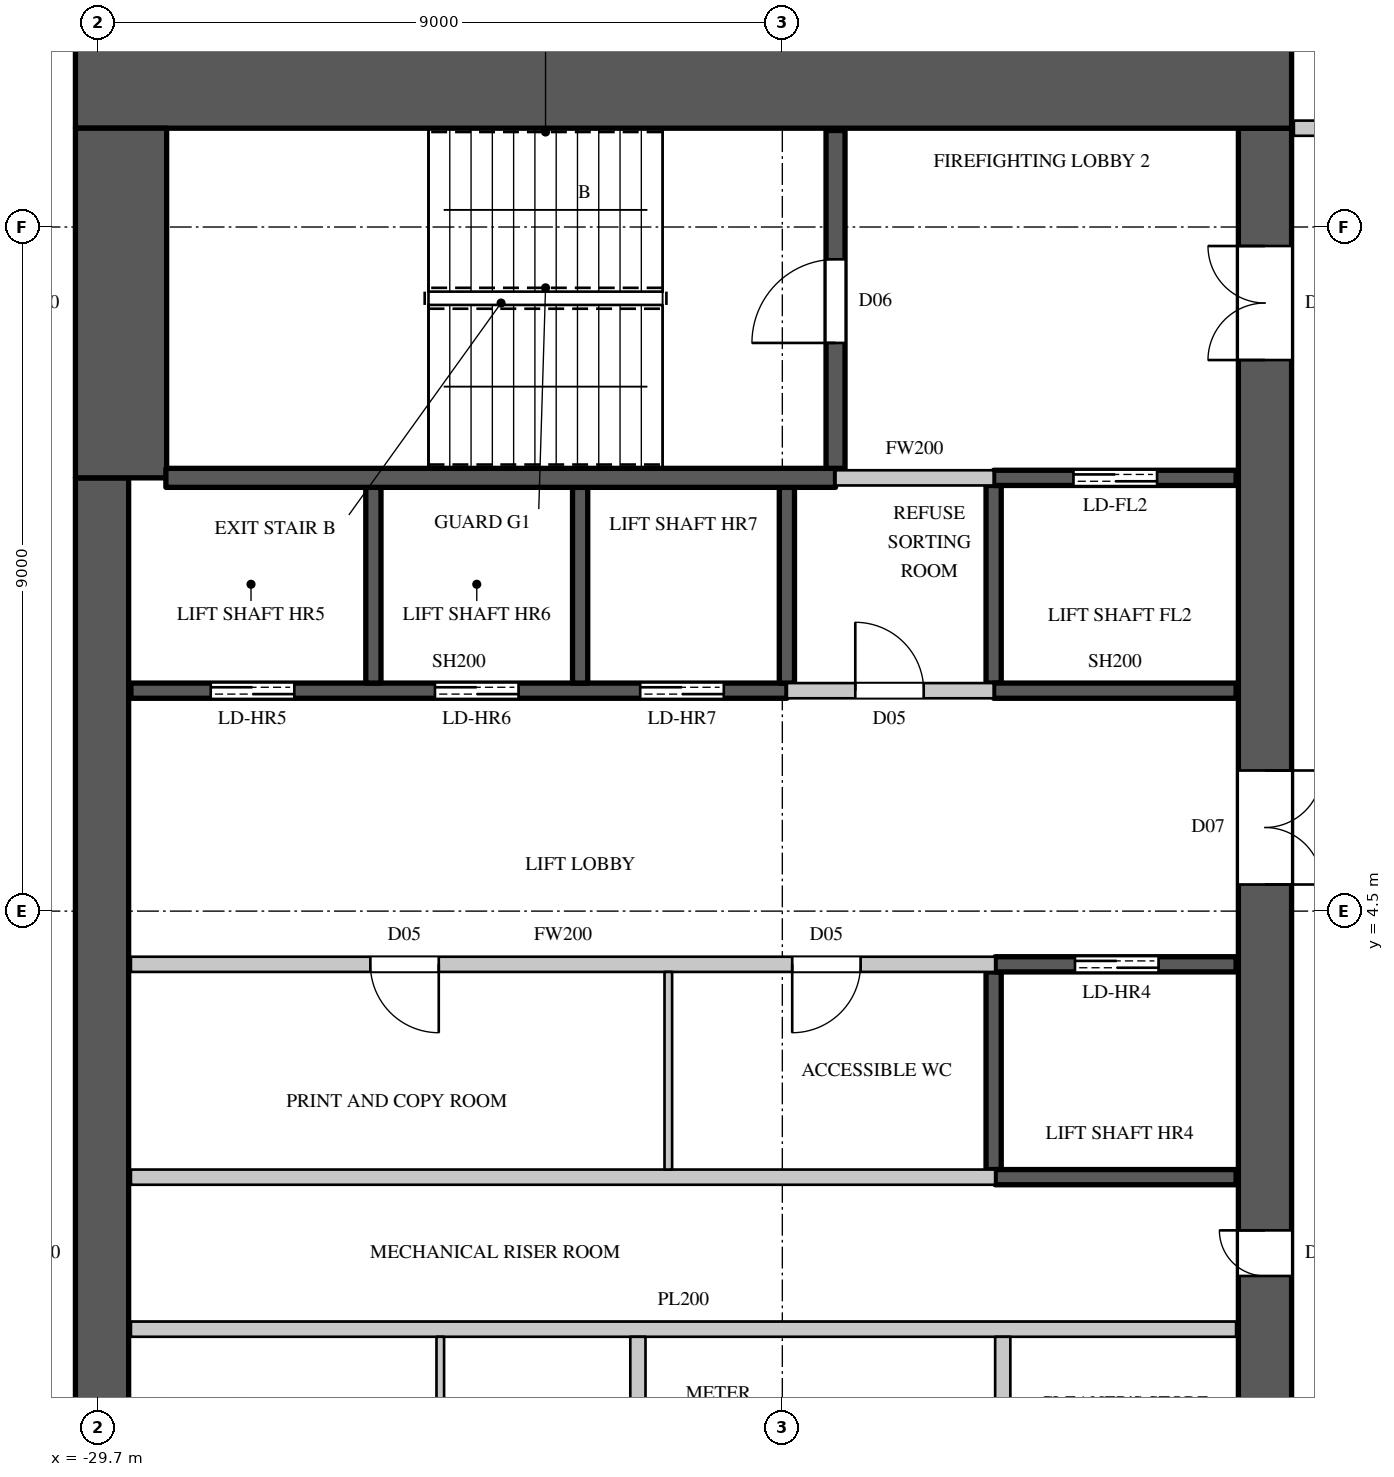
"""IFC4 building model, lengths in metres.
Left out: names, types, materials, properties, quantities, classifications, styles, units other than length and angle.
Written with IfcOpenShell. Run it as: python <this file> out.ifc"""

import sys

from ifc_helpers import new_model, si_unit, direction, frame, frame_2d, origin, place, context, subcontext, project, spatial, rectangle, extrude, element, fill, save


model = new_model("IFC4")
c1 = context("Model", 3, precision=1e-05, world=origin(), true_north=direction((0.0, 1.0)))
c2 = subcontext(c1, "Body", "Model", "MODEL_VIEW")
j1 = project(units=[si_unit("LENGTHUNIT", "METRE"), si_unit("PLANEANGLEUNIT", "RADIAN")], contexts=[c1])
p1 = place(None, origin())
s1 = spatial("IfcSite", under=j1, at=p1, CompositionType="ELEMENT")
p2 = place(p1, origin())
s2 = spatial("IfcBuilding", under=s1, at=p2, CompositionType="ELEMENT")
p3 = place(p2, frame((0.0, 0.0, 325.4)))
s3 = spatial("IfcBuildingStorey", under=s2, at=p3, CompositionType="ELEMENT", Elevation=325.4)
p4 = place(p3, frame((-30.0, 15.4, 0.0), z_axis=(0.0, 0.0, 1.0), x_axis=(1.0, 0.0, 0.0)))
e1 = element("IfcWall", 1, at=p4, inside=s3, PredefinedType="SHEAR", context=c2, shape_type="SweptSolid", body=[
    extrude(rectangle(XDim=16.0, YDim=1.2, at=frame_2d((8.0, 0.0))), origin(), (0.0, 0.0, 1.0), 4.1),
])
p5 = place(p3, frame((-14.35, -14.8, 0.0), z_axis=(0.0, 0.0, 1.0), x_axis=(0.0, 1.0, 0.0)))
e2 = element("IfcWall", 2, at=p5, inside=s3, PredefinedType="SHEAR", context=c2, shape_type="SweptSolid", body=[
    extrude(rectangle(XDim=29.6, YDim=0.7, at=frame_2d((14.8, 0.0))), origin(), (0.0, 0.0, 1.0), 4.1),
])
p6 = place(p5, frame((1.55, 0.0, 0.0)))
e3 = element("IfcOpeningElement", 3, at=p6, cuts=e2, PredefinedType="OPENING", context=c2, shape_type="SweptSolid", body=[
    extrude(rectangle(XDim=1.5, YDim=2.4, at=frame_2d((0.75, 1.2))), frame((0.0, 0.36, 0.0), z_axis=(0.0, -1.0, 0.0), x_axis=(1.0, 0.0, 0.0)), (0.0, 0.0, 1.0), 0.72),
])
p7 = place(p5, frame((26.55, 0.0, 0.0)))
e4 = element("IfcOpeningElement", 4, at=p7, cuts=e2, PredefinedType="OPENING", context=c2, shape_type="SweptSolid", body=[
    extrude(rectangle(XDim=1.5, YDim=2.4, at=frame_2d((0.75, 1.2))), frame((0.0, 0.36, 0.0), z_axis=(0.0, -1.0, 0.0), x_axis=(1.0, 0.0, 0.0)), (0.0, 0.0, 1.0), 0.72),
])
p8 = place(p5, frame((8.45, 0.0, 0.0)))
e5 = element("IfcOpeningElement", 5, at=p8, cuts=e2, PredefinedType="OPENING", context=c2, shape_type="SweptSolid", body=[
    extrude(rectangle(XDim=1.5, YDim=2.4, at=frame_2d((0.75, 1.2))), frame((0.0, 0.36, 0.0), z_axis=(0.0, -1.0, 0.0), x_axis=(1.0, 0.0, 0.0)), (0.0, 0.0, 1.0), 0.72),
])
p9 = place(p5, frame((19.65, 0.0, 0.0)))
e6 = element("IfcOpeningElement", 6, at=p9, cuts=e2, PredefinedType="OPENING", context=c2, shape_type="SweptSolid", body=[
    extrude(rectangle(XDim=1.5, YDim=2.4, at=frame_2d((0.75, 1.2))), frame((0.0, 0.36, 0.0), z_axis=(0.0, -1.0, 0.0), x_axis=(1.0, 0.0, 0.0)), (0.0, 0.0, 1.0), 0.72),
])
p10 = place(p5, frame((14.5, 0.0, 0.0)))
e7 = element("IfcOpeningElement", 7, at=p10, cuts=e2, PredefinedType="OPENING", context=c2, shape_type="SweptSolid", body=[
    extrude(rectangle(XDim=0.6, YDim=2.0, at=frame_2d((0.3, 1.0))), frame((0.0, 0.36, 0.0), z_axis=(0.0, -1.0, 0.0), x_axis=(1.0, 0.0, 0.0)), (0.0, 0.0, 1.0), 0.72),
])
p11 = place(p3, frame((-29.65, -10.2, 0.0), z_axis=(0.0, 0.0, 1.0), x_axis=(0.0, 1.0, 0.0)))
e8 = element("IfcWall", 8, at=p11, inside=s3, PredefinedType="SHEAR", context=c2, shape_type="SweptSolid", body=[
    extrude(rectangle(XDim=20.4, YDim=0.7, at=frame_2d((10.2, 0.0))), origin(), (0.0, 0.0, 1.0), 4.1),
])
p12 = place(p3, frame((-29.4, 10.2, 0.0), z_axis=(0.0, 0.0, 1.0), x_axis=(0.0, 1.0, 0.0)))
e9 = element("IfcWall", 9, at=p12, inside=s3, PredefinedType="SHEAR", context=c2, shape_type="SweptSolid", body=[
    extrude(rectangle(XDim=4.6, YDim=1.2, at=frame_2d((2.3, 0.0))), origin(), (0.0, 0.0, 1.0), 4.1),
])
p13 = place(p3, frame((-29.27, 3.8, 0.0), z_axis=(0.0, 0.0, 1.0), x_axis=(1.0, 0.0, 0.0)))
e10 = element("IfcWall", 10, at=p13, inside=s3, PredefinedType="PARTITIONING", context=c2, shape_type="SweptSolid", body=[
    extrude(rectangle(XDim=11.37, YDim=0.2, at=frame_2d((5.685, 0.0))), origin(), (0.0, 0.0, 1.0), 3.8),
])
p14 = place(p13, frame((3.15, 0.0, 0.0)))
e11 = element("IfcOpeningElement", 11, at=p14, cuts=e10, PredefinedType="OPENING", context=c2, shape_type="SweptSolid", body=[
    extrude(rectangle(XDim=0.9, YDim=2.2, at=frame_2d((0.45, 1.1))), frame((0.0, 0.11, 0.0), z_axis=(0.0, -1.0, 0.0), x_axis=(1.0, 0.0, 0.0)), (0.0, 0.0, 1.0), 0.22),
])
p15 = place(p13, frame((8.7, 0.0, 0.0)))
e12 = element("IfcOpeningElement", 12, at=p15, cuts=e10, PredefinedType="OPENING", context=c2, shape_type="SweptSolid", body=[
    extrude(rectangle(XDim=0.9, YDim=2.2, at=frame_2d((0.45, 1.1))), frame((0.0, 0.11, 0.0), z_axis=(0.0, -1.0, 0.0), x_axis=(1.0, 0.0, 0.0)), (0.0, 0.0, 1.0), 0.22),
])
p16 = place(p3, frame((-20.64, 7.4, 0.0), z_axis=(0.0, 0.0, 1.0), x_axis=(1.0, 0.0, 0.0)))
e13 = element("IfcWall", 13, at=p16, inside=s3, PredefinedType="PARTITIONING", context=c2, shape_type="SweptSolid", body=[
    extrude(rectangle(XDim=2.72, YDim=0.2, at=frame_2d((1.36, 0.0))), origin(), (0.0, 0.0, 1.0), 3.8),
])
p17 = place(p16, frame((0.9, 0.0, 0.0)))
e14 = element("IfcOpeningElement", 14, at=p17, cuts=e13, PredefinedType="OPENING", context=c2, shape_type="SweptSolid", body=[
    extrude(rectangle(XDim=0.9, YDim=2.2, at=frame_2d((0.45, 1.1))), frame((0.0, 0.11, 0.0), z_axis=(0.0, -1.0, 0.0), x_axis=(1.0, 0.0, 0.0)), (0.0, 0.0, 1.0), 0.22),
])
p18 = place(p3, frame((-20.0, 10.2, 0.0), z_axis=(0.0, 0.0, 1.0), x_axis=(1.0, 0.0, 0.0)))
e15 = element("IfcWall", 15, at=p18, inside=s3, PredefinedType="PARTITIONING", context=c2, shape_type="SweptSolid", body=[
    extrude(rectangle(XDim=2.08, YDim=0.2, at=frame_2d((1.04, 0.0))), origin(), (0.0, 0.0, 1.0), 3.8),
])
p19 = place(p3, frame((-13.97, 14.8, 0.0), z_axis=(0.0, 0.0, 1.0), x_axis=(1.0, 0.0, 0.0)))
e16 = element("IfcWall", 16, at=p19, inside=s3, PredefinedType="PARTITIONING", context=c2, shape_type="SweptSolid", body=[
    extrude(rectangle(XDim=3.07, YDim=0.2, at=frame_2d((1.535, 0.0))), origin(), (0.0, 0.0, 1.0), 3.8),
])
p20 = place(p3, frame((-29.27, -1.0, 0.0), z_axis=(0.0, 0.0, 1.0), x_axis=(1.0, 0.0, 0.0)))
e17 = element("IfcWall", 17, at=p20, inside=s3, PredefinedType="PARTITIONING", context=c2, shape_type="SweptSolid", body=[
    extrude(rectangle(XDim=14.54, YDim=0.2, at=frame_2d((7.27, 0.0))), origin(), (0.0, 0.0, 1.0), 3.8),
])
p21 = place(p3, frame((-29.27, 1.0, 0.0), z_axis=(0.0, 0.0, 1.0), x_axis=(1.0, 0.0, 0.0)))
e18 = element("IfcWall", 18, at=p21, inside=s3, PredefinedType="PARTITIONING", context=c2, shape_type="SweptSolid", body=[
    extrude(rectangle(XDim=11.37, YDim=0.2, at=frame_2d((5.685, 0.0))), origin(), (0.0, 0.0, 1.0), 3.8),
])
for number, where, z_axis, x_axis in (
    (19, (-22.6, -3.7, 0.0), (0.0, 0.0, 1.0), (0.0, 1.0, 0.0)),
    (20, (-17.8, -3.7, 0.0), (0.0, 0.0, 1.0), (0.0, 1.0, 0.0)),
):
    element("IfcWall", number, at=place(p3, frame(where, z_axis=z_axis, x_axis=x_axis)), inside=s3, PredefinedType="PARTITIONING", context=c2, shape_type="SweptSolid", body=[
        extrude(rectangle(XDim=2.6, YDim=0.2, at=frame_2d((1.3, 0.0))), origin(), (0.0, 0.0, 1.0), 3.8),
    ])
p22 = place(p3, frame((-29.27, 7.4, 0.0), z_axis=(0.0, 0.0, 1.0), x_axis=(1.0, 0.0, 0.0)))
e21 = element("IfcWall", 21, at=p22, inside=s3, PredefinedType="SHEAR", context=c2, shape_type="SweptSolid", body=[
    extrude(rectangle(XDim=8.63, YDim=0.2, at=frame_2d((4.315, 0.0))), origin(), (0.0, 0.0, 1.0), 3.8),
])
p23 = place(p22, frame((1.05, 0.0, 0.0)))
e22 = element("IfcOpeningElement", 22, at=p23, cuts=e21, PredefinedType="OPENING", context=c2, shape_type="SweptSolid", body=[
    extrude(rectangle(XDim=1.1, YDim=2.2, at=frame_2d((0.55, 1.1))), frame((0.0, 0.11, 0.0), z_axis=(0.0, -1.0, 0.0), x_axis=(1.0, 0.0, 0.0)), (0.0, 0.0, 1.0), 0.22),
])
p24 = place(p22, frame((4.0, 0.0, 0.0)))
e23 = element("IfcOpeningElement", 23, at=p24, cuts=e21, PredefinedType="OPENING", context=c2, shape_type="SweptSolid", body=[
    extrude(rectangle(XDim=1.1, YDim=2.2, at=frame_2d((0.55, 1.1))), frame((0.0, 0.11, 0.0), z_axis=(0.0, -1.0, 0.0), x_axis=(1.0, 0.0, 0.0)), (0.0, 0.0, 1.0), 0.22),
])
p25 = place(p22, frame((6.7, 0.0, 0.0)))
e24 = element("IfcOpeningElement", 24, at=p25, cuts=e21, PredefinedType="OPENING", context=c2, shape_type="SweptSolid", body=[
    extrude(rectangle(XDim=1.1, YDim=2.2, at=frame_2d((0.55, 1.1))), frame((0.0, 0.11, 0.0), z_axis=(0.0, -1.0, 0.0), x_axis=(1.0, 0.0, 0.0)), (0.0, 0.0, 1.0), 0.22),
])
for number, where, z_axis, x_axis in (
    (25, (-26.08, 7.5, 0.0), (0.0, 0.0, 1.0), (0.0, 1.0, 0.0)),
    (26, (-23.36, 7.5, 0.0), (0.0, 0.0, 1.0), (0.0, 1.0, 0.0)),
):
    element("IfcWall", number, at=place(p3, frame(where, z_axis=z_axis, x_axis=x_axis)), inside=s3, PredefinedType="SHEAR", context=c2, shape_type="SweptSolid", body=[
        extrude(rectangle(XDim=2.575, YDim=0.2, at=frame_2d((1.288, 0.0))), origin(), (0.0, 0.0, 1.0), 4.1),
    ])
p26 = place(p3, frame((-20.64, 7.5, 0.0), z_axis=(0.0, 0.0, 1.0), x_axis=(0.0, 1.0, 0.0)))
e27 = element("IfcWall", 27, at=p26, inside=s3, PredefinedType="SHEAR", context=c2, shape_type="SweptSolid", body=[
    extrude(rectangle(XDim=2.575, YDim=0.2, at=frame_2d((1.288, 0.0))), origin(), (0.0, 0.0, 1.0), 3.8),
])
p27 = place(p3, frame((-17.92, 1.1, 0.0), z_axis=(0.0, 0.0, 1.0), x_axis=(0.0, 1.0, 0.0)))
e28 = element("IfcWall", 28, at=p27, inside=s3, PredefinedType="SHEAR", context=c2, shape_type="SweptSolid", body=[
    extrude(rectangle(XDim=2.6, YDim=0.2, at=frame_2d((1.3, 0.0))), origin(), (0.0, 0.0, 1.0), 3.8),
])
p28 = place(p3, frame((-17.9, 1.0, 0.0), z_axis=(0.0, 0.0, 1.0), x_axis=(1.0, 0.0, 0.0)))
e29 = element("IfcWall", 29, at=p28, inside=s3, PredefinedType="SHEAR", context=c2, shape_type="SweptSolid", body=[
    extrude(rectangle(XDim=3.17, YDim=0.2, at=frame_2d((1.585, 0.0))), origin(), (0.0, 0.0, 1.0), 3.8),
])
p29 = place(p3, frame((-17.9, 3.8, 0.0), z_axis=(0.0, 0.0, 1.0), x_axis=(1.0, 0.0, 0.0)))
e30 = element("IfcWall", 30, at=p29, inside=s3, PredefinedType="SHEAR", context=c2, shape_type="SweptSolid", body=[
    extrude(rectangle(XDim=3.17, YDim=0.2, at=frame_2d((1.585, 0.0))), origin(), (0.0, 0.0, 1.0), 3.8),
])
p30 = place(p29, frame((1.05, 0.0, 0.0)))
e31 = element("IfcOpeningElement", 31, at=p30, cuts=e30, PredefinedType="OPENING", context=c2, shape_type="SweptSolid", body=[
    extrude(rectangle(XDim=1.1, YDim=2.2, at=frame_2d((0.55, 1.1))), frame((0.0, 0.11, 0.0), z_axis=(0.0, -1.0, 0.0), x_axis=(1.0, 0.0, 0.0)), (0.0, 0.0, 1.0), 0.22),
])
p31 = place(p3, frame((-17.92, 7.5, 0.0), z_axis=(0.0, 0.0, 1.0), x_axis=(0.0, 1.0, 0.0)))
e32 = element("IfcWall", 32, at=p31, inside=s3, PredefinedType="SHEAR", context=c2, shape_type="SweptSolid", body=[
    extrude(rectangle(XDim=2.6, YDim=0.2, at=frame_2d((1.3, 0.0))), origin(), (0.0, 0.0, 1.0), 3.8),
])
p32 = place(p3, frame((-17.92, 7.4, 0.0), z_axis=(0.0, 0.0, 1.0), x_axis=(1.0, 0.0, 0.0)))
e33 = element("IfcWall", 33, at=p32, inside=s3, PredefinedType="SHEAR", context=c2, shape_type="SweptSolid", body=[
    extrude(rectangle(XDim=3.19, YDim=0.2, at=frame_2d((1.595, 0.0))), origin(), (0.0, 0.0, 1.0), 3.8),
])
p33 = place(p3, frame((-17.92, 10.2, 0.0), z_axis=(0.0, 0.0, 1.0), x_axis=(1.0, 0.0, 0.0)))
e34 = element("IfcWall", 34, at=p33, inside=s3, PredefinedType="SHEAR", context=c2, shape_type="SweptSolid", body=[
    extrude(rectangle(XDim=3.19, YDim=0.2, at=frame_2d((1.595, 0.0))), origin(), (0.0, 0.0, 1.0), 3.8),
])
p34 = place(p33, frame((1.05, 0.0, 0.0)))
e35 = element("IfcOpeningElement", 35, at=p34, cuts=e34, PredefinedType="OPENING", context=c2, shape_type="SweptSolid", body=[
    extrude(rectangle(XDim=1.1, YDim=2.2, at=frame_2d((0.55, 1.1))), frame((0.0, 0.11, 0.0), z_axis=(0.0, -1.0, 0.0), x_axis=(1.0, 0.0, 0.0)), (0.0, 0.0, 1.0), 0.22),
])
p35 = place(p3, frame((-28.81, 10.2, 0.0), z_axis=(0.0, 0.0, 1.0), x_axis=(1.0, 0.0, 0.0)))
e36 = element("IfcWall", 36, at=p35, inside=s3, PredefinedType="SHEAR", context=c2, shape_type="SweptSolid", body=[
    extrude(rectangle(XDim=8.81, YDim=0.25, at=frame_2d((4.405, 0.0))), origin(), (0.0, 0.0, 1.0), 3.8),
])
p36 = place(p3, frame((-20.0, 10.325, 0.0), z_axis=(0.0, 0.0, 1.0), x_axis=(0.0, 1.0, 0.0)))
e37 = element("IfcWall", 37, at=p36, inside=s3, PredefinedType="SHEAR", context=c2, shape_type="SweptSolid", body=[
    extrude(rectangle(XDim=4.445, YDim=0.25, at=frame_2d((2.223, 0.0))), origin(), (0.0, 0.0, 1.0), 3.8),
])
p37 = place(p36, frame((1.65, 0.0, 0.0)))
e38 = element("IfcOpeningElement", 38, at=p37, cuts=e37, PredefinedType="OPENING", context=c2, shape_type="SweptSolid", body=[
    extrude(rectangle(XDim=1.1, YDim=2.2, at=frame_2d((0.55, 1.1))), frame((0.0, 0.135, 0.0), z_axis=(0.0, -1.0, 0.0), x_axis=(1.0, 0.0, 0.0)), (0.0, 0.0, 1.0), 0.27),
])
for number, where, z_axis, x_axis in (
    (39, (-25.2, -3.7, 0.0), (0.0, 0.0, 1.0), (0.0, 1.0, 0.0)),
    (40, (-22.2, 1.1, 0.0), (0.0, 0.0, 1.0), (0.0, 1.0, 0.0)),
):
    element("IfcWall", number, at=place(p3, frame(where, z_axis=z_axis, x_axis=x_axis)), inside=s3, PredefinedType="PARTITIONING", context=c2, shape_type="SweptSolid", body=[
        extrude(rectangle(XDim=2.6, YDim=0.1, at=frame_2d((1.3, 0.0))), origin(), (0.0, 0.0, 1.0), 3.8),
    ])
p38 = place(p37, origin())
e41 = element("IfcDoor", 41, at=p38, inside=s3, OperationType="SINGLE_SWING_LEFT", PredefinedType="DOOR", context=c2, shape_type="SweptSolid", body=[
    extrude(rectangle(XDim=1.1, YDim=2.2, at=frame_2d((0.55, 1.1))), frame((0.0, 0.025, 0.0), z_axis=(0.0, -1.0, 0.0), x_axis=(1.0, 0.0, 0.0)), (0.0, 0.0, 1.0), 0.05),
])
fill(e38, e41)
p39 = place(p14, origin())
e42 = element("IfcDoor", 42, at=p39, inside=s3, OperationType="SINGLE_SWING_LEFT", PredefinedType="DOOR", context=c2, shape_type="SweptSolid", body=[
    extrude(rectangle(XDim=0.9, YDim=2.2, at=frame_2d((0.45, 1.1))), frame((0.0, 0.025, 0.0), z_axis=(0.0, -1.0, 0.0), x_axis=(1.0, 0.0, 0.0)), (0.0, 0.0, 1.0), 0.05),
])
fill(e11, e42)
p40 = place(p15, origin())
e43 = element("IfcDoor", 43, at=p40, inside=s3, OperationType="SINGLE_SWING_RIGHT", PredefinedType="DOOR", context=c2, shape_type="SweptSolid", body=[
    extrude(rectangle(XDim=0.9, YDim=2.2, at=frame_2d((0.45, 1.1))), frame((0.0, 0.025, 0.0), z_axis=(0.0, -1.0, 0.0), x_axis=(1.0, 0.0, 0.0)), (0.0, 0.0, 1.0), 0.05),
])
fill(e12, e43)
p41 = place(p17, origin())
e44 = element("IfcDoor", 44, at=p41, inside=s3, OperationType="SINGLE_SWING_LEFT", PredefinedType="DOOR", context=c2, shape_type="SweptSolid", body=[
    extrude(rectangle(XDim=0.9, YDim=2.2, at=frame_2d((0.45, 1.1))), frame((0.0, 0.025, 0.0), z_axis=(0.0, -1.0, 0.0), x_axis=(1.0, 0.0, 0.0)), (0.0, 0.0, 1.0), 0.05),
])
fill(e14, e44)
p42 = place(p30, origin())
e45 = element("IfcDoor", 45, at=p42, inside=s3, OperationType="DOUBLE_DOOR_SLIDING", PredefinedType="DOOR", context=c2, shape_type="SweptSolid", body=[
    extrude(rectangle(XDim=1.1, YDim=2.2, at=frame_2d((0.55, 1.1))), frame((0.0, 0.025, 0.0), z_axis=(0.0, -1.0, 0.0), x_axis=(1.0, 0.0, 0.0)), (0.0, 0.0, 1.0), 0.05),
])
fill(e31, e45)
p43 = place(p23, origin())
e46 = element("IfcDoor", 46, at=p43, inside=s3, OperationType="DOUBLE_DOOR_SLIDING", PredefinedType="DOOR", context=c2, shape_type="SweptSolid", body=[
    extrude(rectangle(XDim=1.1, YDim=2.2, at=frame_2d((0.55, 1.1))), frame((0.0, 0.025, 0.0), z_axis=(0.0, -1.0, 0.0), x_axis=(1.0, 0.0, 0.0)), (0.0, 0.0, 1.0), 0.05),
])
fill(e22, e46)
p44 = place(p24, origin())
e47 = element("IfcDoor", 47, at=p44, inside=s3, OperationType="DOUBLE_DOOR_SLIDING", PredefinedType="DOOR", context=c2, shape_type="SweptSolid", body=[
    extrude(rectangle(XDim=1.1, YDim=2.2, at=frame_2d((0.55, 1.1))), frame((0.0, 0.025, 0.0), z_axis=(0.0, -1.0, 0.0), x_axis=(1.0, 0.0, 0.0)), (0.0, 0.0, 1.0), 0.05),
])
fill(e23, e47)
p45 = place(p25, origin())
e48 = element("IfcDoor", 48, at=p45, inside=s3, OperationType="DOUBLE_DOOR_SLIDING", PredefinedType="DOOR", context=c2, shape_type="SweptSolid", body=[
    extrude(rectangle(XDim=1.1, YDim=2.2, at=frame_2d((0.55, 1.1))), frame((0.0, 0.025, 0.0), z_axis=(0.0, -1.0, 0.0), x_axis=(1.0, 0.0, 0.0)), (0.0, 0.0, 1.0), 0.05),
])
fill(e24, e48)
p46 = place(p34, origin())
e49 = element("IfcDoor", 49, at=p46, inside=s3, OperationType="DOUBLE_DOOR_SLIDING", PredefinedType="DOOR", context=c2, shape_type="SweptSolid", body=[
    extrude(rectangle(XDim=1.1, YDim=2.2, at=frame_2d((0.55, 1.1))), frame((0.0, 0.025, 0.0), z_axis=(0.0, -1.0, 0.0), x_axis=(1.0, 0.0, 0.0)), (0.0, 0.0, 1.0), 0.05),
])
fill(e35, e49)
p47 = place(p7, origin())
e50 = element("IfcDoor", 50, at=p47, inside=s3, OperationType="DOUBLE_DOOR_SINGLE_SWING", PredefinedType="DOOR", context=c2, shape_type="SweptSolid", body=[
    extrude(rectangle(XDim=1.5, YDim=2.4, at=frame_2d((0.75, 1.2))), frame((0.0, 0.345, 0.0), z_axis=(0.0, -1.0, 0.0), x_axis=(1.0, 0.0, 0.0)), (0.0, 0.0, 1.0), 0.05),
])
fill(e4, e50)
p48 = place(p9, origin())
e51 = element("IfcDoor", 51, at=p48, inside=s3, OperationType="DOUBLE_DOOR_SINGLE_SWING", PredefinedType="DOOR", context=c2, shape_type="SweptSolid", body=[
    extrude(rectangle(XDim=1.5, YDim=2.4, at=frame_2d((0.75, 1.2))), frame((0.0, -0.295, 0.0), z_axis=(0.0, -1.0, 0.0), x_axis=(1.0, 0.0, 0.0)), (0.0, 0.0, 1.0), 0.05),
])
fill(e6, e51)
p49 = place(p10, origin())
e52 = element("IfcDoor", 52, at=p49, inside=s3, OperationType="SINGLE_SWING_RIGHT", PredefinedType="DOOR", context=c2, shape_type="SweptSolid", body=[
    extrude(rectangle(XDim=0.6, YDim=2.0, at=frame_2d((0.3, 1.0))), frame((0.0, 0.345, 0.0), z_axis=(0.0, -1.0, 0.0), x_axis=(1.0, 0.0, 0.0)), (0.0, 0.0, 1.0), 0.05),
])
fill(e7, e52)
save(model, sys.argv[1])
